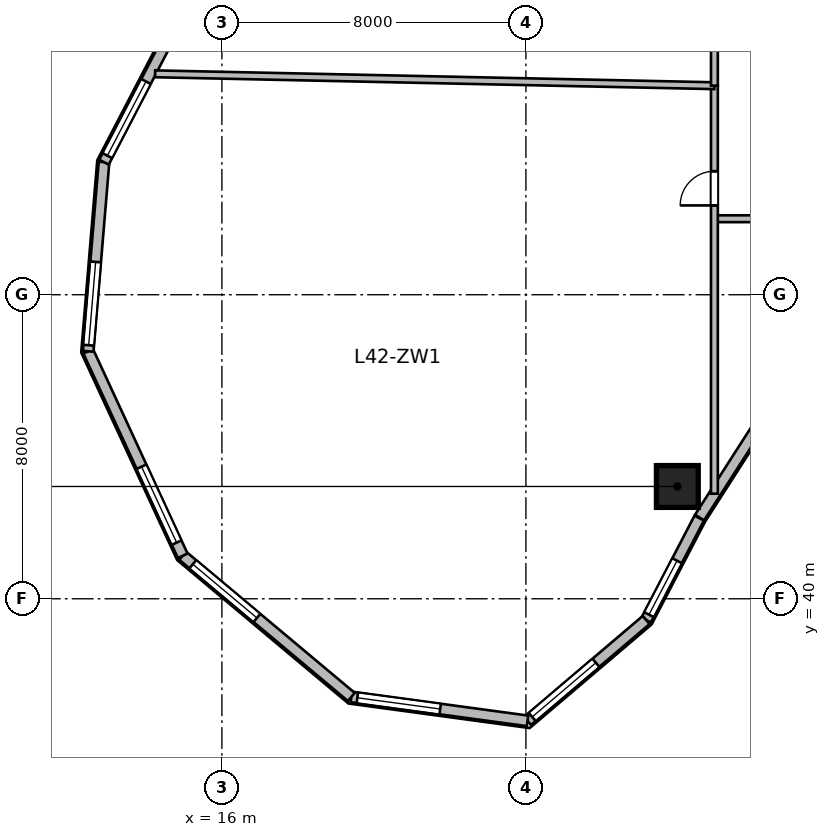
"""IFC4 building model, lengths in metres.
Left out: names, types, materials, properties, quantities, classifications, styles, units other than length and angle.
Written with IfcOpenShell. Run it as: python <this file> out.ifc"""

import sys

from ifc_helpers import new_model, si_unit, direction, frame, frame_2d, origin, origin_2d, place, context, subcontext, project, spatial, rectangle, circle, extrude, source, transform, mapped, element, fill, save


model = new_model("IFC4")
c1 = context("Model", 3, precision=1e-05, world=origin(), true_north=direction((0.0, 1.0)))
c2 = subcontext(c1, "Body", "Model", "MODEL_VIEW")
j1 = project(units=[si_unit("LENGTHUNIT", "METRE"), si_unit("PLANEANGLEUNIT", "RADIAN")], contexts=[c1])
p1 = place(None, origin())
s1 = spatial("IfcSite", under=j1, at=p1, CompositionType="ELEMENT")
p2 = place(p1, origin())
s2 = spatial("IfcBuilding", under=s1, at=p2, CompositionType="ELEMENT")
p3 = place(p2, frame((0.0, 0.0, 174.0)))
s3 = spatial("IfcBuildingStorey", under=s2, at=p3, CompositionType="ELEMENT", Elevation=174.0)
m1 = source(origin(), c2, "Body", "SweptSolid", [
    extrude(circle(Radius=0.55, at=origin_2d()), origin(), (0.0, 0.0, 1.0), 3.9),
])
p4 = place(p3, frame((27.985, 42.955, 0.0), z_axis=(0.0, 0.0, 1.0), x_axis=(-0.690756218984, 0.723087716626, 0.0)))
e1 = element("IfcColumn", 1, at=p4, inside=s3, PredefinedType="COLUMN", context=c2, shape_type="MappedRepresentation", body=[
    mapped(m1, transform((0.0, 0.0, 0.0), scale=1.0)),
])
m2 = source(origin(), c2, "Body", "SweptSolid", [
    extrude(rectangle(XDim=2.981, YDim=0.28, at=frame_2d((1.49, 0.0))), origin(), (0.0, 0.0, 1.0), 3.65),
])
p5 = place(p3, frame((30.179, 44.645, 0.0), z_axis=(0.0, 0.0, 1.0), x_axis=(-0.540194451908, -0.841540227278, 0.0)))
e2 = element("IfcWall", 2, at=p5, inside=s3, PredefinedType="SOLIDWALL", context=c2, shape_type="MappedRepresentation", body=[
    mapped(m2, transform((0.0, 0.0, 0.0), scale=1.0)),
])
m3 = source(origin(), c2, "Body", "SweptSolid", [
    extrude(rectangle(XDim=3.024, YDim=0.28, at=frame_2d((1.512, 0.0))), origin(), (0.0, 0.0, 1.0), 3.65),
])
p6 = place(p3, frame((28.561, 42.123, 0.0), z_axis=(0.0, 0.0, 1.0), x_axis=(-0.461718746531, -0.887026380161, 0.0)))
e3 = element("IfcWall", 3, at=p6, inside=s3, PredefinedType="SOLIDWALL", context=c2, shape_type="MappedRepresentation", body=[
    mapped(m3, transform((0.0, 0.0, 0.0), scale=1.0)),
])
p7 = place(p6, frame((1.264, 0.0, 0.95)))
e4 = element("IfcOpeningElement", 4, at=p7, cuts=e3, PredefinedType="OPENING", context=c2, shape_type="SweptSolid", body=[
    extrude(rectangle(XDim=1.6, YDim=1.9, at=frame_2d((0.8, 0.95))), frame((0.0, 0.15, 0.0), z_axis=(0.0, -1.0, 0.0), x_axis=(1.0, 0.0, 0.0)), (0.0, 0.0, 1.0), 0.3),
])
m4 = source(origin(), c2, "Body", "SweptSolid", [
    extrude(rectangle(XDim=4.096, YDim=0.28, at=frame_2d((2.048, 0.0))), origin(), (0.0, 0.0, 1.0), 3.65),
])
p8 = place(p3, frame((27.164, 39.44, 0.0), z_axis=(0.0, 0.0, 1.0), x_axis=(-0.761926081737, -0.647663991564, 0.0)))
e5 = element("IfcWall", 5, at=p8, inside=s3, PredefinedType="SOLIDWALL", context=c2, shape_type="MappedRepresentation", body=[
    mapped(m4, transform((0.0, 0.0, 0.0), scale=1.0)),
])
p9 = place(p8, frame((1.736, 0.0, 0.95)))
e6 = element("IfcOpeningElement", 6, at=p9, cuts=e5, PredefinedType="OPENING", context=c2, shape_type="SweptSolid", body=[
    extrude(rectangle(XDim=2.2, YDim=2.1, at=frame_2d((1.1, 1.05))), frame((0.0, 0.15, 0.0), z_axis=(0.0, -1.0, 0.0), x_axis=(1.0, 0.0, 0.0)), (0.0, 0.0, 1.0), 0.3),
])
m5 = source(origin(), c2, "Body", "SweptSolid", [
    extrude(rectangle(XDim=4.68, YDim=0.28, at=frame_2d((2.34, 0.0))), origin(), (0.0, 0.0, 1.0), 3.65),
])
p10 = place(p3, frame((24.043, 36.788, 0.0), z_axis=(0.0, 0.0, 1.0), x_axis=(-0.990931146435, 0.134370618162, 0.0)))
e7 = element("IfcWall", 7, at=p10, inside=s3, PredefinedType="SOLIDWALL", context=c2, shape_type="MappedRepresentation", body=[
    mapped(m5, transform((0.0, 0.0, 0.0), scale=1.0)),
])
p11 = place(p10, frame((2.32, 0.0, 0.95)))
e8 = element("IfcOpeningElement", 8, at=p11, cuts=e7, PredefinedType="OPENING", context=c2, shape_type="SweptSolid", body=[
    extrude(rectangle(XDim=2.2, YDim=2.1, at=frame_2d((1.1, 1.05))), frame((0.0, 0.15, 0.0), z_axis=(0.0, -1.0, 0.0), x_axis=(1.0, 0.0, 0.0)), (0.0, 0.0, 1.0), 0.3),
])
m6 = source(origin(), c2, "Body", "SweptSolid", [
    extrude(rectangle(XDim=5.786, YDim=0.28, at=frame_2d((2.893, 0.0))), origin(), (0.0, 0.0, 1.0), 3.65),
])
p12 = place(p3, frame((19.406, 37.417, 0.0), z_axis=(0.0, 0.0, 1.0), x_axis=(-0.766711306852, 0.641992034176, 0.0)))
e9 = element("IfcWall", 9, at=p12, inside=s3, PredefinedType="SOLIDWALL", context=c2, shape_type="MappedRepresentation", body=[
    mapped(m6, transform((0.0, 0.0, 0.0), scale=1.0)),
])
p13 = place(p12, frame((3.24, 0.0, 0.95)))
e10 = element("IfcOpeningElement", 10, at=p13, cuts=e9, PredefinedType="OPENING", context=c2, shape_type="SweptSolid", body=[
    extrude(rectangle(XDim=2.2, YDim=2.1, at=frame_2d((1.1, 1.05))), frame((0.0, 0.15, 0.0), z_axis=(0.0, -1.0, 0.0), x_axis=(1.0, 0.0, 0.0)), (0.0, 0.0, 1.0), 0.3),
])
m7 = source(origin(), c2, "Body", "SweptSolid", [
    extrude(rectangle(XDim=5.927, YDim=0.28, at=frame_2d((2.964, 0.0))), origin(), (0.0, 0.0, 1.0), 3.65),
])
p14 = place(p3, frame((14.969, 41.131, 0.0), z_axis=(0.0, 0.0, 1.0), x_axis=(-0.419656204795, 0.907683132914, 0.0)))
e11 = element("IfcWall", 11, at=p14, inside=s3, PredefinedType="SOLIDWALL", context=c2, shape_type="MappedRepresentation", body=[
    mapped(m7, transform((0.0, 0.0, 0.0), scale=1.0)),
])
p15 = place(p14, frame((0.382, 0.0, 0.95)))
e12 = element("IfcOpeningElement", 12, at=p15, cuts=e11, PredefinedType="OPENING", context=c2, shape_type="SweptSolid", body=[
    extrude(rectangle(XDim=2.2, YDim=2.1, at=frame_2d((1.1, 1.05))), frame((0.0, 0.15, 0.0), z_axis=(0.0, -1.0, 0.0), x_axis=(1.0, 0.0, 0.0)), (0.0, 0.0, 1.0), 0.3),
])
m8 = source(origin(), c2, "Body", "SweptSolid", [
    extrude(rectangle(XDim=4.994, YDim=0.28, at=frame_2d((2.497, 0.0))), origin(), (0.0, 0.0, 1.0), 3.65),
])
p16 = place(p3, frame((12.481, 46.512, 0.0), z_axis=(0.0, 0.0, 1.0), x_axis=(0.083344839916, 0.996520766296, 0.0)))
e13 = element("IfcWall", 13, at=p16, inside=s3, PredefinedType="SOLIDWALL", context=c2, shape_type="MappedRepresentation", body=[
    mapped(m8, transform((0.0, 0.0, 0.0), scale=1.0)),
])
p17 = place(p16, frame((0.16, 0.0, 0.95)))
e14 = element("IfcOpeningElement", 14, at=p17, cuts=e13, PredefinedType="OPENING", context=c2, shape_type="SweptSolid", body=[
    extrude(rectangle(XDim=2.2, YDim=2.1, at=frame_2d((1.1, 1.05))), frame((0.0, 0.15, 0.0), z_axis=(0.0, -1.0, 0.0), x_axis=(1.0, 0.0, 0.0)), (0.0, 0.0, 1.0), 0.3),
])
m9 = source(origin(), c2, "Body", "SweptSolid", [
    extrude(rectangle(XDim=5.171, YDim=0.28, at=frame_2d((2.585, 0.0))), origin(), (0.0, 0.0, 1.0), 3.65),
])
p18 = place(p3, frame((12.898, 51.489, 0.0), z_axis=(0.0, 0.0, 1.0), x_axis=(0.461752581363, 0.887008767491, 0.0)))
e15 = element("IfcWall", 15, at=p18, inside=s3, PredefinedType="SOLIDWALL", context=c2, shape_type="MappedRepresentation", body=[
    mapped(m9, transform((0.0, 0.0, 0.0), scale=1.0)),
])
p19 = place(p18, frame((0.193, 0.0, 0.95)))
e16 = element("IfcOpeningElement", 16, at=p19, cuts=e15, PredefinedType="OPENING", context=c2, shape_type="SweptSolid", body=[
    extrude(rectangle(XDim=2.2, YDim=2.1, at=frame_2d((1.1, 1.05))), frame((0.0, 0.15, 0.0), z_axis=(0.0, -1.0, 0.0), x_axis=(1.0, 0.0, 0.0)), (0.0, 0.0, 1.0), 0.3),
])
m10 = source(origin(), c2, "Body", "SweptSolid", [
    extrude(rectangle(XDim=2.5, YDim=0.18, at=frame_2d((1.25, 0.0))), origin(), (0.0, 0.0, 1.0), 3.65),
])
p20 = place(p3, frame((29.0, 50.0, 0.0), z_axis=(0.0, 0.0, 1.0), x_axis=(1.0, 0.0, 0.0)))
e17 = element("IfcWall", 17, at=p20, inside=s3, PredefinedType="PLUMBINGWALL", context=c2, shape_type="MappedRepresentation", body=[
    mapped(m10, transform((0.0, 0.0, 0.0), scale=1.0)),
])
m11 = source(origin(), c2, "Body", "SweptSolid", [
    extrude(rectangle(XDim=10.735, YDim=0.18, at=frame_2d((5.368, 0.0))), origin(), (0.0, 0.0, 1.0), 2.942),
])
p21 = place(p3, frame((28.96, 42.765, 0.0), z_axis=(0.0, 0.0, 1.0), x_axis=(0.0, 1.0, 0.0)))
e18 = element("IfcWall", 18, at=p21, inside=s3, PredefinedType="PLUMBINGWALL", context=c2, shape_type="MappedRepresentation", body=[
    mapped(m11, transform((0.0, 0.0, 0.0), scale=1.0)),
])
p22 = place(p21, frame((7.585, 0.0, 0.0)))
e19 = element("IfcOpeningElement", 19, at=p22, cuts=e18, PredefinedType="OPENING", context=c2, shape_type="SweptSolid", body=[
    extrude(rectangle(XDim=0.9, YDim=2.08, at=frame_2d((0.45, 1.04))), frame((0.0, 0.1, 0.0), z_axis=(0.0, -1.0, 0.0), x_axis=(1.0, 0.0, 0.0)), (0.0, 0.0, 1.0), 0.2),
])
m12 = source(origin(), c2, "Body", "SweptSolid", [
    extrude(rectangle(XDim=14.72, YDim=0.18, at=frame_2d((7.36, 0.0))), origin(), (0.0, 0.0, 1.0), 3.65),
])
p23 = place(p3, frame((14.243, 53.813, 0.0), z_axis=(0.0, 0.0, 1.0), x_axis=(0.999773932637, -0.021262258118, 0.0)))
e20 = element("IfcWall", 20, at=p23, inside=s3, PredefinedType="PLUMBINGWALL", context=c2, shape_type="MappedRepresentation", body=[
    mapped(m12, transform((0.0, 0.0, 0.0), scale=1.0)),
])
m13 = source(origin(), c2, "Body", "SweptSolid", [
    extrude(rectangle(XDim=6.5, YDim=0.18, at=frame_2d((3.25, 0.0))), origin(), (0.0, 0.0, 1.0), 3.081),
])
p24 = place(p3, frame((28.96, 53.5, 0.0), z_axis=(0.0, 0.0, 1.0), x_axis=(0.0, 1.0, 0.0)))
e21 = element("IfcWall", 21, at=p24, inside=s3, PredefinedType="PLUMBINGWALL", context=c2, shape_type="MappedRepresentation", body=[
    mapped(m13, transform((0.0, 0.0, 0.0), scale=1.0)),
])
p25 = place(p24, frame((2.8, 0.0, 0.0)))
e22 = element("IfcOpeningElement", 22, at=p25, cuts=e21, PredefinedType="OPENING", context=c2, shape_type="SweptSolid", body=[
    extrude(rectangle(XDim=0.9, YDim=2.08, at=frame_2d((0.45, 1.04))), frame((0.0, 0.1, 0.0), z_axis=(0.0, -1.0, 0.0), x_axis=(1.0, 0.0, 0.0)), (0.0, 0.0, 1.0), 0.2),
])
m14 = source(origin(), c2, "Body", "SweptSolid", [
    extrude(rectangle(XDim=1.6, YDim=1.9, at=frame_2d((0.8, 0.95))), frame((0.0, 0.03, 0.0), z_axis=(0.0, -1.0, 0.0), x_axis=(1.0, 0.0, 0.0)), (0.0, 0.0, 1.0), 0.06),
])
p26 = place(p7, origin())
e23 = element("IfcWindow", 23, at=p26, inside=s3, PartitioningType="SINGLE_PANEL", PredefinedType="WINDOW", context=c2, shape_type="MappedRepresentation", body=[
    mapped(m14, transform((0.0, 0.0, 0.0), scale=1.0)),
])
fill(e4, e23)
m15 = source(origin(), c2, "Body", "SweptSolid", [
    extrude(rectangle(XDim=2.2, YDim=2.1, at=frame_2d((1.1, 1.05))), frame((0.0, 0.03, 0.0), z_axis=(0.0, -1.0, 0.0), x_axis=(1.0, 0.0, 0.0)), (0.0, 0.0, 1.0), 0.06),
])
p27 = place(p9, origin())
e24 = element("IfcWindow", 24, at=p27, inside=s3, PartitioningType="TRIPLE_PANEL_VERTICAL", PredefinedType="WINDOW", context=c2, shape_type="MappedRepresentation", body=[
    mapped(m15, transform((0.0, 0.0, 0.0), scale=1.0)),
])
fill(e6, e24)
p28 = place(p11, origin())
e25 = element("IfcWindow", 25, at=p28, inside=s3, PartitioningType="TRIPLE_PANEL_VERTICAL", PredefinedType="WINDOW", context=c2, shape_type="MappedRepresentation", body=[
    mapped(m15, transform((0.0, 0.0, 0.0), scale=1.0)),
])
fill(e8, e25)
p29 = place(p13, origin())
e26 = element("IfcWindow", 26, at=p29, inside=s3, PartitioningType="TRIPLE_PANEL_VERTICAL", PredefinedType="WINDOW", context=c2, shape_type="MappedRepresentation", body=[
    mapped(m15, transform((0.0, 0.0, 0.0), scale=1.0)),
])
fill(e10, e26)
p30 = place(p15, origin())
e27 = element("IfcWindow", 27, at=p30, inside=s3, PartitioningType="TRIPLE_PANEL_VERTICAL", PredefinedType="WINDOW", context=c2, shape_type="MappedRepresentation", body=[
    mapped(m15, transform((0.0, 0.0, 0.0), scale=1.0)),
])
fill(e12, e27)
p31 = place(p17, origin())
e28 = element("IfcWindow", 28, at=p31, inside=s3, PartitioningType="TRIPLE_PANEL_VERTICAL", PredefinedType="WINDOW", context=c2, shape_type="MappedRepresentation", body=[
    mapped(m15, transform((0.0, 0.0, 0.0), scale=1.0)),
])
fill(e14, e28)
p32 = place(p19, origin())
e29 = element("IfcWindow", 29, at=p32, inside=s3, PartitioningType="TRIPLE_PANEL_VERTICAL", PredefinedType="WINDOW", context=c2, shape_type="MappedRepresentation", body=[
    mapped(m15, transform((0.0, 0.0, 0.0), scale=1.0)),
])
fill(e16, e29)
m16 = source(origin(), c2, "Body", "SweptSolid", [
    extrude(rectangle(XDim=0.9, YDim=2.08, at=frame_2d((0.45, 1.04))), frame((0.0, 0.025, 0.0), z_axis=(0.0, -1.0, 0.0), x_axis=(1.0, 0.0, 0.0)), (0.0, 0.0, 1.0), 0.05),
])
p33 = place(p22, origin())
e30 = element("IfcDoor", 30, at=p33, inside=s3, OperationType="SINGLE_SWING_LEFT", PredefinedType="DOOR", context=c2, shape_type="MappedRepresentation", body=[
    mapped(m16, transform((0.0, 0.0, 0.0), scale=1.0)),
])
fill(e19, e30)
save(model, sys.argv[1])
